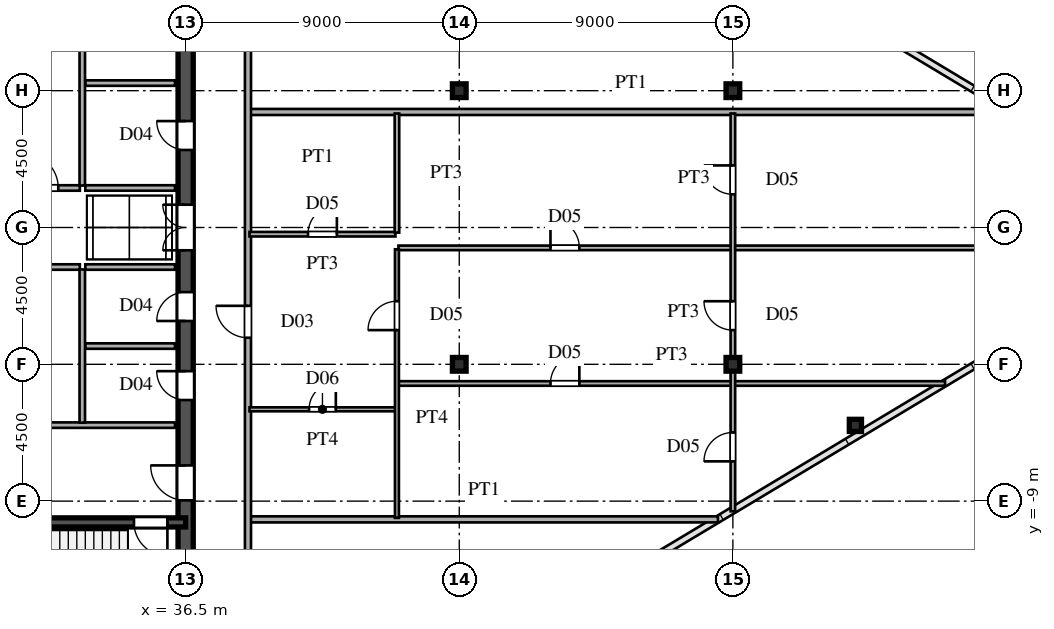
"""IFC4 building model, lengths in metres.
Left out: names, types, materials, properties, quantities, classifications, styles, units other than length and angle.
Written with IfcOpenShell. Run it as: python <this file> out.ifc"""

import sys

from ifc_helpers import new_model, si_unit, direction, frame, frame_2d, origin, origin_2d, place, context, subcontext, project, spatial, rectangle, hollow_rectangle, i_section, extrude, source, transform, mapped, element, fill, save


model = new_model("IFC4")
c1 = context("Model", 3, precision=1e-05, world=origin(), true_north=direction((0.0, 1.0)))
c2 = subcontext(c1, "Body", "Model", "MODEL_VIEW")
j1 = project(units=[si_unit("LENGTHUNIT", "METRE"), si_unit("PLANEANGLEUNIT", "RADIAN")], contexts=[c1])
p1 = place(None, origin())
s1 = spatial("IfcSite", under=j1, at=p1, CompositionType="ELEMENT")
p2 = place(p1, origin())
s2 = spatial("IfcBuilding", under=s1, at=p2, CompositionType="ELEMENT")
p3 = place(p2, frame((0.0, 0.0, 258.15)))
s3 = spatial("IfcBuildingStorey", under=s2, at=p3, CompositionType="ELEMENT", Elevation=258.15)
m1 = source(origin(), c2, "Body", "SweptSolid", [
    extrude(i_section(OverallWidth=0.45, OverallDepth=0.45, WebThickness=0.016, FlangeThickness=0.025, at=origin_2d()), origin(), (0.0, 0.0, 1.0), 3.75),
])
for number, where, z_axis, x_axis in (
    (1, (45.5, -4.5, 0.0), (0.0, 0.0, 1.0), (1.0, 0.0, 0.0)),
    (2, (45.5, 4.5, 0.0), (0.0, 0.0, 1.0), (1.0, 0.0, 0.0)),
    (3, (54.5, -4.5, 0.0), (0.0, 0.0, 1.0), (1.0, 0.0, 0.0)),
    (4, (54.5, 4.5, 0.0), (0.0, 0.0, 1.0), (1.0, 0.0, 0.0)),
):
    element("IfcColumn", number, at=place(p3, frame(where, z_axis=z_axis, x_axis=x_axis)), inside=s3, PredefinedType="COLUMN", context=c2, shape_type="MappedRepresentation", body=[
        mapped(m1, transform((0.0, 0.0, 0.0), scale=1.0)),
    ])
m2 = source(origin(), c2, "Body", "SweptSolid", [
    extrude(hollow_rectangle(XDim=0.4, YDim=0.4, WallThickness=0.016, at=origin_2d()), origin(), (0.0, 0.0, 1.0), 3.75),
])
p4 = place(p3, frame((58.53, -6.509, 0.0), z_axis=(0.0, 0.0, 1.0), x_axis=(1.0, 0.0, 0.0)))
e5 = element("IfcColumn", 5, at=p4, inside=s3, PredefinedType="COLUMN", context=c2, shape_type="MappedRepresentation", body=[
    mapped(m2, transform((0.0, 0.0, 0.0), scale=1.0)),
])
p5 = place(p3, frame((36.5, -13.65, 0.0), z_axis=(0.0, 0.0, 1.0), x_axis=(0.0, 1.0, 0.0)))
e6 = element("IfcWall", 6, at=p5, inside=s3, PredefinedType="SHEAR", context=c2, shape_type="SweptSolid", body=[
    extrude(rectangle(XDim=7.15, YDim=0.5, at=frame_2d((3.575, 0.0))), origin(), (0.0, 0.0, 1.0), 3.53),
])
p6 = place(p5, frame((4.675, 0.0, 0.0)))
e7 = element("IfcOpeningElement", 7, at=p6, cuts=e6, PredefinedType="OPENING", context=c2, shape_type="SweptSolid", body=[
    extrude(rectangle(XDim=1.15, YDim=2.2, at=frame_2d((0.575, 1.1))), frame((0.0, 0.26, 0.0), z_axis=(0.0, -1.0, 0.0), x_axis=(1.0, 0.0, 0.0)), (0.0, 0.0, 1.0), 0.52),
])
p7 = place(p3, frame((36.5, -1.3, 0.0), z_axis=(0.0, 0.0, 1.0), x_axis=(0.0, 1.0, 0.0)))
e8 = element("IfcWall", 8, at=p7, inside=s3, PredefinedType="SHEAR", context=c2, shape_type="SweptSolid", body=[
    extrude(rectangle(XDim=2.6, YDim=0.5, at=frame_2d((1.3, 0.0))), origin(), (0.0, 0.0, 1.0), 3.53),
])
p8 = place(p7, frame((0.55, 0.0, 0.0)))
e9 = element("IfcOpeningElement", 9, at=p8, cuts=e8, PredefinedType="OPENING", context=c2, shape_type="SweptSolid", body=[
    extrude(rectangle(XDim=1.5, YDim=2.3, at=frame_2d((0.75, 1.15))), frame((0.0, 0.26, 0.0), z_axis=(0.0, -1.0, 0.0), x_axis=(1.0, 0.0, 0.0)), (0.0, 0.0, 1.0), 0.52),
])
p9 = place(p3, frame((36.5, -6.5, 0.0), z_axis=(0.0, 0.0, 1.0), x_axis=(0.0, 1.0, 0.0)))
e10 = element("IfcWall", 10, at=p9, inside=s3, PredefinedType="SHEAR", context=c2, shape_type="SweptSolid", body=[
    extrude(rectangle(XDim=2.6, YDim=0.5, at=frame_2d((1.3, 0.0))), origin(), (0.0, 0.0, 1.0), 3.53),
])
p10 = place(p9, frame((0.825, 0.0, 0.0)))
e11 = element("IfcOpeningElement", 11, at=p10, cuts=e10, PredefinedType="OPENING", context=c2, shape_type="SweptSolid", body=[
    extrude(rectangle(XDim=0.95, YDim=2.15, at=frame_2d((0.475, 1.075))), frame((0.0, 0.26, 0.0), z_axis=(0.0, -1.0, 0.0), x_axis=(1.0, 0.0, 0.0)), (0.0, 0.0, 1.0), 0.52),
])
p11 = place(p3, frame((36.5, -3.9, 0.0), z_axis=(0.0, 0.0, 1.0), x_axis=(0.0, 1.0, 0.0)))
e12 = element("IfcWall", 12, at=p11, inside=s3, PredefinedType="SHEAR", context=c2, shape_type="SweptSolid", body=[
    extrude(rectangle(XDim=2.6, YDim=0.5, at=frame_2d((1.3, 0.0))), origin(), (0.0, 0.0, 1.0), 3.53),
])
p12 = place(p11, frame((0.825, 0.0, 0.0)))
e13 = element("IfcOpeningElement", 13, at=p12, cuts=e12, PredefinedType="OPENING", context=c2, shape_type="SweptSolid", body=[
    extrude(rectangle(XDim=0.95, YDim=2.15, at=frame_2d((0.475, 1.075))), frame((0.0, 0.26, 0.0), z_axis=(0.0, -1.0, 0.0), x_axis=(1.0, 0.0, 0.0)), (0.0, 0.0, 1.0), 0.52),
])
p13 = place(p3, frame((36.5, 1.3, 0.0), z_axis=(0.0, 0.0, 1.0), x_axis=(0.0, 1.0, 0.0)))
e14 = element("IfcWall", 14, at=p13, inside=s3, PredefinedType="SHEAR", context=c2, shape_type="SweptSolid", body=[
    extrude(rectangle(XDim=3.45, YDim=0.5, at=frame_2d((1.725, 0.0))), origin(), (0.0, 0.0, 1.0), 3.53),
])
p14 = place(p13, frame((1.25, 0.0, 0.0)))
e15 = element("IfcOpeningElement", 15, at=p14, cuts=e14, PredefinedType="OPENING", context=c2, shape_type="SweptSolid", body=[
    extrude(rectangle(XDim=0.95, YDim=2.15, at=frame_2d((0.475, 1.075))), frame((0.0, 0.26, 0.0), z_axis=(0.0, -1.0, 0.0), x_axis=(1.0, 0.0, 0.0)), (0.0, 0.0, 1.0), 0.52),
])
p15 = place(p3, frame((36.5, 4.75, 0.0), z_axis=(0.0, 0.0, 1.0), x_axis=(0.0, 1.0, 0.0)))
e16 = element("IfcWall", 16, at=p15, inside=s3, PredefinedType="SHEAR", context=c2, shape_type="SweptSolid", body=[
    extrude(rectangle(XDim=3.45, YDim=0.5, at=frame_2d((1.725, 0.0))), origin(), (0.0, 0.0, 1.0), 3.53),
])
p16 = place(p15, frame((1.25, 0.0, 0.0)))
e17 = element("IfcOpeningElement", 17, at=p16, cuts=e16, PredefinedType="OPENING", context=c2, shape_type="SweptSolid", body=[
    extrude(rectangle(XDim=0.95, YDim=2.15, at=frame_2d((0.475, 1.075))), frame((0.0, 0.26, 0.0), z_axis=(0.0, -1.0, 0.0), x_axis=(1.0, 0.0, 0.0)), (0.0, 0.0, 1.0), 0.52),
])
p17 = place(p3, frame((27.5, -9.7, 0.0), z_axis=(0.0, 0.0, 1.0), x_axis=(1.0, 0.0, 0.0)))
e18 = element("IfcWall", 18, at=p17, inside=s3, PredefinedType="SHEAR", context=c2, shape_type="SweptSolid", body=[
    extrude(rectangle(XDim=9.0, YDim=0.3, at=frame_2d((4.5, 0.0))), origin(), (0.0, 0.0, 1.0), 3.53),
])
p18 = place(p17, frame((7.3, 0.0, 0.0)))
e19 = element("IfcOpeningElement", 19, at=p18, cuts=e18, PredefinedType="OPENING", context=c2, shape_type="SweptSolid", body=[
    extrude(rectangle(XDim=1.1, YDim=2.2, at=frame_2d((0.55, 1.1))), frame((0.0, 0.16, 0.0), z_axis=(0.0, -1.0, 0.0), x_axis=(1.0, 0.0, 0.0)), (0.0, 0.0, 1.0), 0.32),
])
p19 = place(p3, frame((30.45, -6.5, 0.0), z_axis=(0.0, 0.0, 1.0), x_axis=(1.0, 0.0, 0.0)))
e20 = element("IfcWall", 20, at=p19, inside=s3, PredefinedType="PARTITIONING", context=c2, shape_type="SweptSolid", body=[
    extrude(rectangle(XDim=5.7, YDim=0.18, at=frame_2d((2.85, 0.0))), origin(), (0.0, 0.0, 1.0), 3.53),
])
p20 = place(p3, frame((33.1, -6.42, 0.0), z_axis=(0.0, 0.0, 1.0), x_axis=(0.0, 1.0, 0.0)))
e21 = element("IfcWall", 21, at=p20, inside=s3, PredefinedType="PARTITIONING", context=c2, shape_type="SweptSolid", body=[
    extrude(rectangle(XDim=5.04, YDim=0.18, at=frame_2d((2.52, 0.0))), origin(), (0.0, 0.0, 1.0), 3.53),
])
p21 = place(p3, frame((33.1, 1.38, 0.0), z_axis=(0.0, 0.0, 1.0), x_axis=(0.0, 1.0, 0.0)))
e22 = element("IfcWall", 22, at=p21, inside=s3, PredefinedType="PARTITIONING", context=c2, shape_type="SweptSolid", body=[
    extrude(rectangle(XDim=6.74, YDim=0.18, at=frame_2d((3.37, 0.0))), origin(), (0.0, 0.0, 1.0), 3.53),
])
p22 = place(p3, frame((30.3, -1.3, 0.0), z_axis=(0.0, 0.0, 1.0), x_axis=(1.0, 0.0, 0.0)))
e23 = element("IfcWall", 23, at=p22, inside=s3, PredefinedType="PARTITIONING", context=c2, shape_type="SweptSolid", body=[
    extrude(rectangle(XDim=2.72, YDim=0.18, at=frame_2d((1.36, 0.0))), origin(), (0.0, 0.0, 1.0), 3.53),
])
p23 = place(p22, frame((0.21, 0.0, 0.0)))
e24 = element("IfcOpeningElement", 24, at=p23, cuts=e23, PredefinedType="OPENING", context=c2, shape_type="SweptSolid", body=[
    extrude(rectangle(XDim=1.15, YDim=2.2, at=frame_2d((0.575, 1.1))), frame((0.0, 0.1, 0.0), z_axis=(0.0, -1.0, 0.0), x_axis=(1.0, 0.0, 0.0)), (0.0, 0.0, 1.0), 0.2),
])
p24 = place(p3, frame((30.45, 1.3, 0.0), z_axis=(0.0, 0.0, 1.0), x_axis=(1.0, 0.0, 0.0)))
e25 = element("IfcWall", 25, at=p24, inside=s3, PredefinedType="PARTITIONING", context=c2, shape_type="SweptSolid", body=[
    extrude(rectangle(XDim=2.57, YDim=0.18, at=frame_2d((1.285, 0.0))), origin(), (0.0, 0.0, 1.0), 3.53),
])
p25 = place(p24, frame((0.71, 0.0, 0.0)))
e26 = element("IfcOpeningElement", 26, at=p25, cuts=e25, PredefinedType="OPENING", context=c2, shape_type="SweptSolid", body=[
    extrude(rectangle(XDim=1.15, YDim=2.2, at=frame_2d((0.575, 1.1))), frame((0.0, 0.1, 0.0), z_axis=(0.0, -1.0, 0.0), x_axis=(1.0, 0.0, 0.0)), (0.0, 0.0, 1.0), 0.2),
])
for number, where, z_axis, x_axis in (
    (27, (33.2, -1.3, 0.0), (0.0, 0.0, 1.0), (1.0, 0.0, 0.0)),
    (28, (33.2, 1.3, 0.0), (0.0, 0.0, 1.0), (1.0, 0.0, 0.0)),
    (29, (33.2, -3.9, 0.0), (0.0, 0.0, 1.0), (1.0, 0.0, 0.0)),
    (30, (33.2, 4.75, 0.0), (0.0, 0.0, 1.0), (1.0, 0.0, 0.0)),
):
    element("IfcWall", number, at=place(p3, frame(where, z_axis=z_axis, x_axis=x_axis)), inside=s3, PredefinedType="PARTITIONING", context=c2, shape_type="SweptSolid", body=[
        extrude(rectangle(XDim=2.95, YDim=0.18, at=frame_2d((1.475, 0.0))), origin(), (0.0, 0.0, 1.0), 3.53),
    ])
p26 = place(p3, frame((38.63, -9.6, 0.0), z_axis=(0.0, 0.0, 1.0), x_axis=(1.0, 0.0, 0.0)))
e31 = element("IfcWall", 31, at=p26, inside=s3, PredefinedType="PARTITIONING", context=c2, shape_type="SweptSolid", body=[
    extrude(rectangle(XDim=15.38, YDim=0.2, at=frame_2d((7.69, 0.0))), origin(), (0.0, 0.0, 1.0), 3.53),
])
p27 = place(p3, frame((38.6, -5.98, 0.0), z_axis=(0.0, 0.0, 1.0), x_axis=(1.0, 0.0, 0.0)))
e32 = element("IfcWall", 32, at=p27, inside=s3, PredefinedType="PARTITIONING", context=c2, shape_type="SweptSolid", body=[
    extrude(rectangle(XDim=4.8, YDim=0.13, at=frame_2d((2.4, 0.0))), origin(), (0.0, 0.0, 1.0), 3.53),
])
p28 = place(p27, frame((1.96, 0.0, 0.0)))
e33 = element("IfcOpeningElement", 33, at=p28, cuts=e32, PredefinedType="OPENING", context=c2, shape_type="SweptSolid", body=[
    extrude(rectangle(XDim=0.88, YDim=2.1, at=frame_2d((0.44, 1.05))), frame((0.0, 0.075, 0.0), z_axis=(0.0, -1.0, 0.0), x_axis=(1.0, 0.0, 0.0)), (0.0, 0.0, 1.0), 0.15),
])
p29 = place(p3, frame((43.5, -5.13, 0.0), z_axis=(0.0, 0.0, 1.0), x_axis=(1.0, 0.0, 0.0)))
e34 = element("IfcWall", 34, at=p29, inside=s3, PredefinedType="PARTITIONING", context=c2, shape_type="SweptSolid", body=[
    extrude(rectangle(XDim=17.98, YDim=0.15, at=frame_2d((8.99, 0.0))), origin(), (0.0, 0.0, 1.0), 3.53),
])
p30 = place(p29, frame((5.0, 0.0, 0.0)))
e35 = element("IfcOpeningElement", 35, at=p30, cuts=e34, PredefinedType="OPENING", context=c2, shape_type="SweptSolid", body=[
    extrude(rectangle(XDim=0.95, YDim=2.15, at=frame_2d((0.475, 1.075))), frame((0.0, 0.085, 0.0), z_axis=(0.0, -1.0, 0.0), x_axis=(1.0, 0.0, 0.0)), (0.0, 0.0, 1.0), 0.17),
])
p31 = place(p3, frame((43.5, -0.67, 0.0), z_axis=(0.0, 0.0, 1.0), x_axis=(1.0, 0.0, 0.0)))
e36 = element("IfcWall", 36, at=p31, inside=s3, PredefinedType="PARTITIONING", context=c2, shape_type="SweptSolid", body=[
    extrude(rectangle(XDim=24.035, YDim=0.15, at=frame_2d((12.018, 0.0))), origin(), (0.0, 0.0, 1.0), 3.53),
])
p32 = place(p31, frame((5.0, 0.0, 0.0)))
e37 = element("IfcOpeningElement", 37, at=p32, cuts=e36, PredefinedType="OPENING", context=c2, shape_type="SweptSolid", body=[
    extrude(rectangle(XDim=0.95, YDim=2.15, at=frame_2d((0.475, 1.075))), frame((0.0, 0.085, 0.0), z_axis=(0.0, -1.0, 0.0), x_axis=(1.0, 0.0, 0.0)), (0.0, 0.0, 1.0), 0.17),
])
p33 = place(p3, frame((38.6, -0.22, 0.0), z_axis=(0.0, 0.0, 1.0), x_axis=(1.0, 0.0, 0.0)))
e38 = element("IfcWall", 38, at=p33, inside=s3, PredefinedType="PARTITIONING", context=c2, shape_type="SweptSolid", body=[
    extrude(rectangle(XDim=4.8, YDim=0.15, at=frame_2d((2.4, 0.0))), origin(), (0.0, 0.0, 1.0), 3.53),
])
p34 = place(p33, frame((1.925, 0.0, 0.0)))
e39 = element("IfcOpeningElement", 39, at=p34, cuts=e38, PredefinedType="OPENING", context=c2, shape_type="SweptSolid", body=[
    extrude(rectangle(XDim=0.95, YDim=2.15, at=frame_2d((0.475, 1.075))), frame((0.0, 0.085, 0.0), z_axis=(0.0, -1.0, 0.0), x_axis=(1.0, 0.0, 0.0)), (0.0, 0.0, 1.0), 0.17),
])
p35 = place(p3, frame((38.63, 3.8, 0.0), z_axis=(0.0, 0.0, 1.0), x_axis=(1.0, 0.0, 0.0)))
e40 = element("IfcWall", 40, at=p35, inside=s3, PredefinedType="PARTITIONING", context=c2, shape_type="SweptSolid", body=[
    extrude(rectangle(XDim=25.046, YDim=0.2, at=frame_2d((12.523, 0.0))), origin(), (0.0, 0.0, 1.0), 3.53),
])
p36 = place(p3, frame((38.55, -15.515, 0.0), z_axis=(0.0, 0.0, 1.0), x_axis=(0.0, 1.0, 0.0)))
e41 = element("IfcWall", 41, at=p36, inside=s3, PredefinedType="PARTITIONING", context=c2, shape_type="SweptSolid", body=[
    extrude(rectangle(XDim=31.03, YDim=0.2, at=frame_2d((15.515, 0.0))), origin(), (0.0, 0.0, 1.0), 3.53),
])
p37 = place(p36, frame((2.39, 0.0, 0.0)))
e42 = element("IfcOpeningElement", 42, at=p37, cuts=e41, PredefinedType="OPENING", context=c2, shape_type="SweptSolid", body=[
    extrude(rectangle(XDim=1.05, YDim=2.25, at=frame_2d((0.525, 1.125))), frame((0.0, 0.11, 0.0), z_axis=(0.0, -1.0, 0.0), x_axis=(1.0, 0.0, 0.0)), (0.0, 0.0, 1.0), 0.22),
])
p38 = place(p36, frame((11.889, 0.0, 0.0)))
e43 = element("IfcOpeningElement", 43, at=p38, cuts=e41, PredefinedType="OPENING", context=c2, shape_type="SweptSolid", body=[
    extrude(rectangle(XDim=1.05, YDim=2.25, at=frame_2d((0.525, 1.125))), frame((0.0, 0.11, 0.0), z_axis=(0.0, -1.0, 0.0), x_axis=(1.0, 0.0, 0.0)), (0.0, 0.0, 1.0), 0.22),
])
p39 = place(p36, frame((24.69, 0.0, 0.0)))
e44 = element("IfcOpeningElement", 44, at=p39, cuts=e41, PredefinedType="OPENING", context=c2, shape_type="SweptSolid", body=[
    extrude(rectangle(XDim=1.05, YDim=2.25, at=frame_2d((0.525, 1.125))), frame((0.0, 0.11, 0.0), z_axis=(0.0, -1.0, 0.0), x_axis=(1.0, 0.0, 0.0)), (0.0, 0.0, 1.0), 0.22),
])
p40 = place(p3, frame((43.45, -9.55, 0.0), z_axis=(0.0, 0.0, 1.0), x_axis=(0.0, 1.0, 0.0)))
e45 = element("IfcWall", 45, at=p40, inside=s3, PredefinedType="PARTITIONING", context=c2, shape_type="SweptSolid", body=[
    extrude(rectangle(XDim=8.833, YDim=0.13, at=frame_2d((4.417, 0.0))), origin(), (0.0, 0.0, 1.0), 3.53),
])
p41 = place(p40, frame((6.175, 0.0, 0.0)))
e46 = element("IfcOpeningElement", 46, at=p41, cuts=e45, PredefinedType="OPENING", context=c2, shape_type="SweptSolid", body=[
    extrude(rectangle(XDim=0.95, YDim=2.15, at=frame_2d((0.475, 1.075))), frame((0.0, 0.075, 0.0), z_axis=(0.0, -1.0, 0.0), x_axis=(1.0, 0.0, 0.0)), (0.0, 0.0, 1.0), 0.15),
])
p42 = place(p3, frame((43.45, -0.168, 0.0), z_axis=(0.0, 0.0, 1.0), x_axis=(0.0, 1.0, 0.0)))
e47 = element("IfcWall", 47, at=p42, inside=s3, PredefinedType="PARTITIONING", context=c2, shape_type="SweptSolid", body=[
    extrude(rectangle(XDim=3.918, YDim=0.15, at=frame_2d((1.959, 0.0))), origin(), (0.0, 0.0, 1.0), 3.53),
])
p43 = place(p3, frame((54.5, -9.335, 0.0), z_axis=(0.0, 0.0, 1.0), x_axis=(0.0, 1.0, 0.0)))
e48 = element("IfcWall", 48, at=p43, inside=s3, PredefinedType="PARTITIONING", context=c2, shape_type="SweptSolid", body=[
    extrude(rectangle(XDim=13.085, YDim=0.15, at=frame_2d((6.542, 0.0))), origin(), (0.0, 0.0, 1.0), 2.93),
])
p44 = place(p43, frame((5.96, 0.0, 0.0)))
e49 = element("IfcOpeningElement", 49, at=p44, cuts=e48, PredefinedType="OPENING", context=c2, shape_type="SweptSolid", body=[
    extrude(rectangle(XDim=0.95, YDim=2.15, at=frame_2d((0.475, 1.075))), frame((0.0, 0.085, 0.0), z_axis=(0.0, -1.0, 0.0), x_axis=(1.0, 0.0, 0.0)), (0.0, 0.0, 1.0), 0.17),
])
p45 = place(p43, frame((1.643, 0.0, 0.0)))
e50 = element("IfcOpeningElement", 50, at=p45, cuts=e48, PredefinedType="OPENING", context=c2, shape_type="SweptSolid", body=[
    extrude(rectangle(XDim=0.95, YDim=2.15, at=frame_2d((0.475, 1.075))), frame((0.0, 0.085, 0.0), z_axis=(0.0, -1.0, 0.0), x_axis=(1.0, 0.0, 0.0)), (0.0, 0.0, 1.0), 0.17),
])
p46 = place(p43, frame((10.427, 0.0, 0.0)))
e51 = element("IfcOpeningElement", 51, at=p46, cuts=e48, PredefinedType="OPENING", context=c2, shape_type="SweptSolid", body=[
    extrude(rectangle(XDim=0.95, YDim=2.15, at=frame_2d((0.475, 1.075))), frame((0.0, 0.085, 0.0), z_axis=(0.0, -1.0, 0.0), x_axis=(1.0, 0.0, 0.0)), (0.0, 0.0, 1.0), 0.17),
])
m3 = source(origin(), c2, "Body", "SweptSolid", [
    extrude(rectangle(XDim=1.15, YDim=2.2, at=frame_2d((0.575, 1.1))), frame((0.0, 0.025, 0.0), z_axis=(0.0, -1.0, 0.0), x_axis=(1.0, 0.0, 0.0)), (0.0, 0.0, 1.0), 0.05),
])
p47 = place(p6, origin())
e52 = element("IfcDoor", 52, at=p47, inside=s3, OperationType="SINGLE_SWING_RIGHT", PredefinedType="DOOR", context=c2, shape_type="MappedRepresentation", body=[
    mapped(m3, transform((0.0, 0.0, 0.0), scale=1.0)),
])
fill(e7, e52)
m4 = source(origin(), c2, "Body", "SweptSolid", [
    extrude(rectangle(XDim=1.5, YDim=2.3, at=frame_2d((0.75, 1.15))), frame((0.0, 0.025, 0.0), z_axis=(0.0, -1.0, 0.0), x_axis=(1.0, 0.0, 0.0)), (0.0, 0.0, 1.0), 0.05),
])
p48 = place(p8, origin())
e53 = element("IfcDoor", 53, at=p48, inside=s3, OperationType="DOUBLE_SWING_LEFT", PredefinedType="DOOR", context=c2, shape_type="MappedRepresentation", body=[
    mapped(m4, transform((0.0, 0.0, 0.0), scale=1.0)),
])
fill(e9, e53)
m5 = source(origin(), c2, "Body", "SweptSolid", [
    extrude(rectangle(XDim=0.95, YDim=2.15, at=frame_2d((0.475, 1.075))), frame((0.0, 0.025, 0.0), z_axis=(0.0, -1.0, 0.0), x_axis=(1.0, 0.0, 0.0)), (0.0, 0.0, 1.0), 0.05),
])
p49 = place(p10, origin())
e54 = element("IfcDoor", 54, at=p49, inside=s3, OperationType="SINGLE_SWING_RIGHT", PredefinedType="DOOR", context=c2, shape_type="MappedRepresentation", body=[
    mapped(m5, transform((0.0, 0.0, 0.0), scale=1.0)),
])
fill(e11, e54)
p50 = place(p12, origin())
e55 = element("IfcDoor", 55, at=p50, inside=s3, OperationType="SINGLE_SWING_LEFT", PredefinedType="DOOR", context=c2, shape_type="MappedRepresentation", body=[
    mapped(m5, transform((0.0, 0.0, 0.0), scale=1.0)),
])
fill(e13, e55)
p51 = place(p14, origin())
e56 = element("IfcDoor", 56, at=p51, inside=s3, OperationType="SINGLE_SWING_RIGHT", PredefinedType="DOOR", context=c2, shape_type="MappedRepresentation", body=[
    mapped(m5, transform((0.0, 0.0, 0.0), scale=1.0)),
])
fill(e15, e56)
m6 = source(origin(), c2, "Body", "SweptSolid", [
    extrude(rectangle(XDim=1.1, YDim=2.2, at=frame_2d((0.55, 1.1))), frame((0.0, 0.025, 0.0), z_axis=(0.0, -1.0, 0.0), x_axis=(1.0, 0.0, 0.0)), (0.0, 0.0, 1.0), 0.05),
])
p52 = place(p18, frame((1.1, 0.0, 0.0), z_axis=(0.0, 0.0, 1.0), x_axis=(-1.0, 0.0, 0.0)))
e57 = element("IfcDoor", 57, at=p52, inside=s3, OperationType="SINGLE_SWING_RIGHT", PredefinedType="DOOR", context=c2, shape_type="MappedRepresentation", body=[
    mapped(m6, transform((0.0, 0.0, 0.0), scale=1.0)),
])
fill(e19, e57)
p53 = place(p25, origin())
e58 = element("IfcDoor", 58, at=p53, inside=s3, OperationType="SINGLE_SWING_LEFT", PredefinedType="DOOR", context=c2, shape_type="MappedRepresentation", body=[
    mapped(m3, transform((0.0, 0.0, 0.0), scale=1.0)),
])
fill(e26, e58)
m7 = source(origin(), c2, "Body", "SweptSolid", [
    extrude(rectangle(XDim=0.88, YDim=2.1, at=frame_2d((0.44, 1.05))), frame((0.0, 0.025, 0.0), z_axis=(0.0, -1.0, 0.0), x_axis=(1.0, 0.0, 0.0)), (0.0, 0.0, 1.0), 0.05),
])
p54 = place(p28, origin())
e59 = element("IfcDoor", 59, at=p54, inside=s3, OperationType="SINGLE_SWING_RIGHT", PredefinedType="DOOR", context=c2, shape_type="MappedRepresentation", body=[
    mapped(m7, transform((0.0, 0.0, 0.0), scale=1.0)),
])
fill(e33, e59)
m8 = source(origin(), c2, "Body", "SweptSolid", [
    extrude(rectangle(XDim=0.95, YDim=2.15, at=frame_2d((0.475, 1.075))), frame((0.0, 0.025, 0.0), z_axis=(0.0, -1.0, 0.0), x_axis=(1.0, 0.0, 0.0)), (0.0, 0.0, 1.0), 0.05),
])
p55 = place(p30, origin())
e60 = element("IfcDoor", 60, at=p55, inside=s3, OperationType="SINGLE_SWING_RIGHT", PredefinedType="DOOR", context=c2, shape_type="MappedRepresentation", body=[
    mapped(m8, transform((0.0, 0.0, 0.0), scale=1.0)),
])
fill(e35, e60)
p56 = place(p32, origin())
e61 = element("IfcDoor", 61, at=p56, inside=s3, OperationType="SINGLE_SWING_LEFT", PredefinedType="DOOR", context=c2, shape_type="MappedRepresentation", body=[
    mapped(m8, transform((0.0, 0.0, 0.0), scale=1.0)),
])
fill(e37, e61)
p57 = place(p34, origin())
e62 = element("IfcDoor", 62, at=p57, inside=s3, OperationType="SINGLE_SWING_RIGHT", PredefinedType="DOOR", context=c2, shape_type="MappedRepresentation", body=[
    mapped(m8, transform((0.0, 0.0, 0.0), scale=1.0)),
])
fill(e39, e62)
m9 = source(origin(), c2, "Body", "SweptSolid", [
    extrude(rectangle(XDim=1.05, YDim=2.25, at=frame_2d((0.525, 1.125))), frame((0.0, 0.025, 0.0), z_axis=(0.0, -1.0, 0.0), x_axis=(1.0, 0.0, 0.0)), (0.0, 0.0, 1.0), 0.05),
])
p58 = place(p38, origin())
e63 = element("IfcDoor", 63, at=p58, inside=s3, OperationType="SINGLE_SWING_RIGHT", PredefinedType="DOOR", context=c2, shape_type="MappedRepresentation", body=[
    mapped(m9, transform((0.0, 0.0, 0.0), scale=1.0)),
])
fill(e43, e63)
p59 = place(p41, origin())
e64 = element("IfcDoor", 64, at=p59, inside=s3, OperationType="SINGLE_SWING_LEFT", PredefinedType="DOOR", context=c2, shape_type="MappedRepresentation", body=[
    mapped(m8, transform((0.0, 0.0, 0.0), scale=1.0)),
])
fill(e46, e64)
p60 = place(p44, origin())
e65 = element("IfcDoor", 65, at=p60, inside=s3, OperationType="SINGLE_SWING_RIGHT", PredefinedType="DOOR", context=c2, shape_type="MappedRepresentation", body=[
    mapped(m8, transform((0.0, 0.0, 0.0), scale=1.0)),
])
fill(e49, e65)
p61 = place(p45, origin())
e66 = element("IfcDoor", 66, at=p61, inside=s3, OperationType="SINGLE_SWING_LEFT", PredefinedType="DOOR", context=c2, shape_type="MappedRepresentation", body=[
    mapped(m8, transform((0.0, 0.0, 0.0), scale=1.0)),
])
fill(e50, e66)
p62 = place(p46, origin())
e67 = element("IfcDoor", 67, at=p62, inside=s3, OperationType="SINGLE_SWING_RIGHT", PredefinedType="DOOR", context=c2, shape_type="MappedRepresentation", body=[
    mapped(m8, transform((0.0, 0.0, 0.0), scale=1.0)),
])
fill(e51, e67)
save(model, sys.argv[1])
